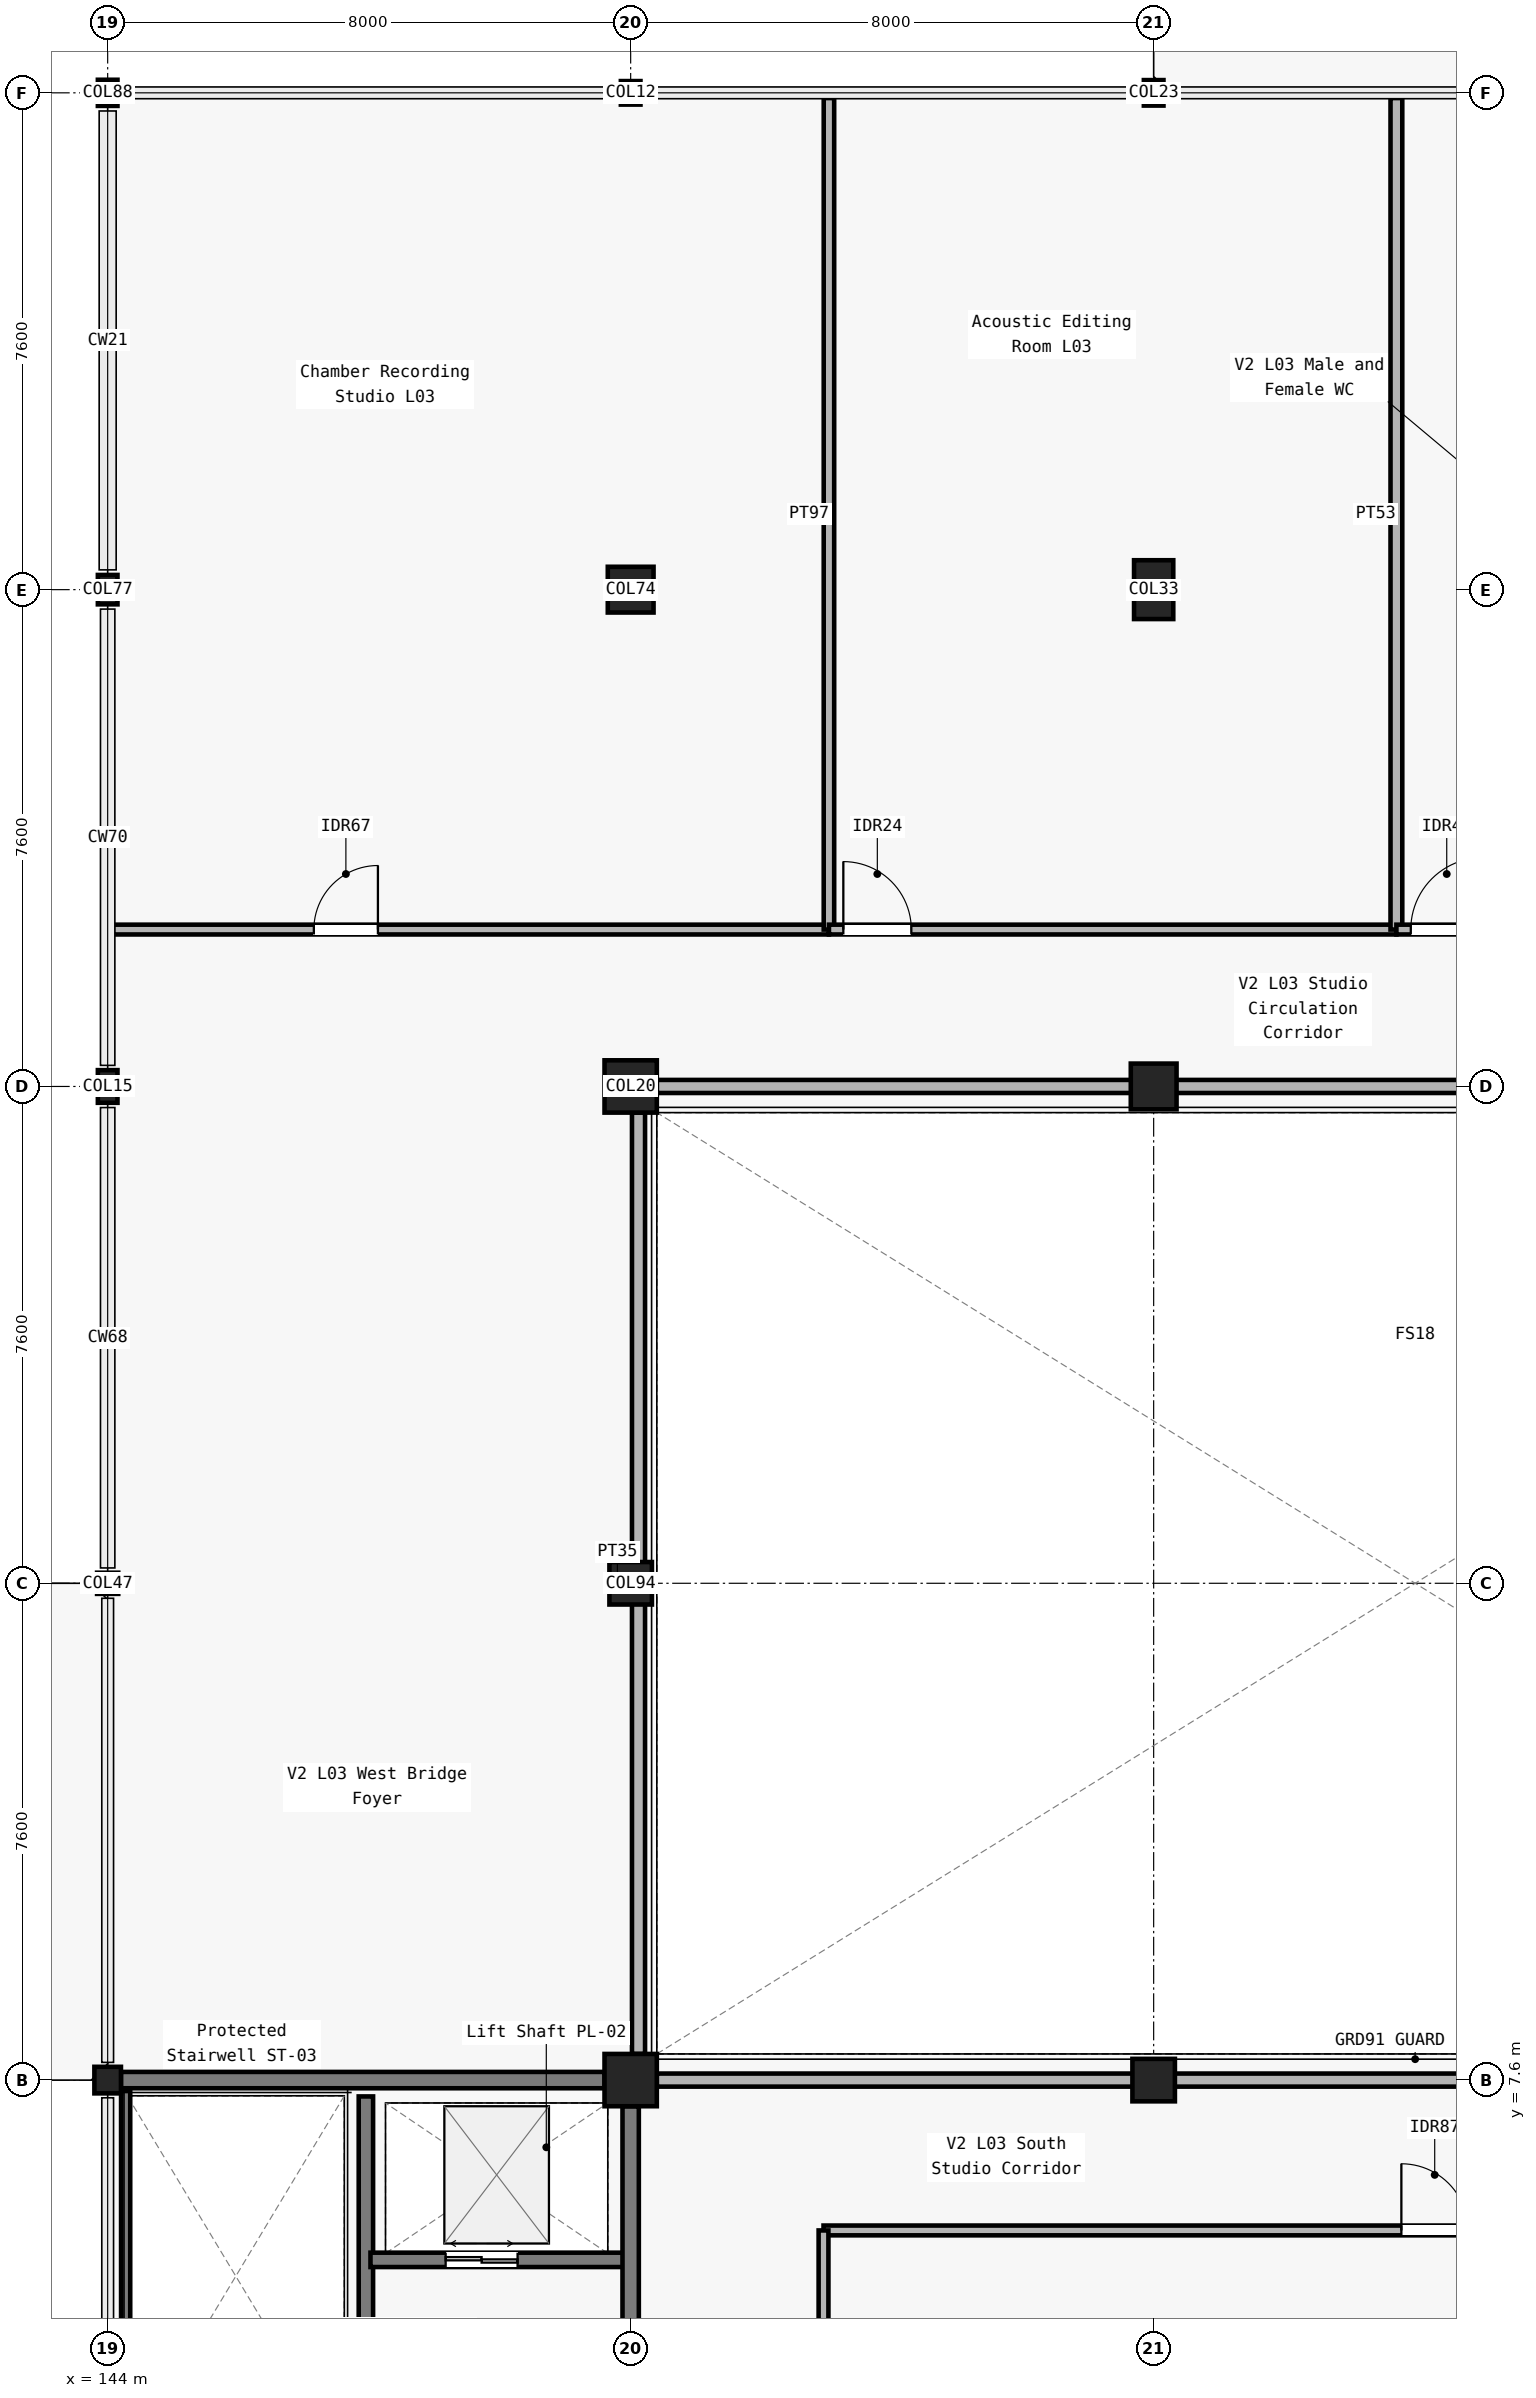
"""IFC4 building model, lengths in metres.
Left out: names, types, materials, properties, quantities, classifications, styles, units other than length and angle.
Written with IfcOpenShell. Run it as: python <this file> out.ifc"""

import sys

from ifc_helpers import new_model, si_unit, direction, frame, frame_2d, origin, origin_2d, place, context, subcontext, project, spatial, rectangle, circle, hollow_circle, i_section, extrude, element, fill, save


model = new_model("IFC4")
c1 = context("Model", 3, precision=1e-05, world=origin(), true_north=direction((0.0, 1.0)))
c2 = subcontext(c1, "Body", "Model", "MODEL_VIEW")
j1 = project(units=[si_unit("LENGTHUNIT", "METRE"), si_unit("PLANEANGLEUNIT", "RADIAN")], contexts=[c1])
p1 = place(None, origin())
s1 = spatial("IfcSite", under=j1, at=p1, CompositionType="ELEMENT")
p2 = place(p1, origin())
s2 = spatial("IfcBuilding", under=s1, at=p2, CompositionType="ELEMENT")
p3 = place(p2, frame((0.0, 0.0, 15.0)))
s3 = spatial("IfcBuildingStorey", under=s2, at=p3, CompositionType="ELEMENT", Elevation=15.0)
p4 = place(p3, frame((144.0, 7.6, 0.0), z_axis=(0.0, 0.0, 1.0), x_axis=(1.0, 0.0, 0.0)))
e1 = element("IfcColumn", 1, at=p4, inside=s3, PredefinedType="COLUMN", context=c2, shape_type="SweptSolid", body=[
    extrude(hollow_circle(Radius=0.203, WallThickness=0.02, at=origin_2d()), origin(), (0.0, 0.0, 1.0), 4.53),
])
p5 = place(p3, frame((144.0, 15.2, 0.0), z_axis=(0.0, 0.0, 1.0), x_axis=(1.0, 0.0, 0.0)))
e2 = element("IfcColumn", 2, at=p5, inside=s3, PredefinedType="COLUMN", context=c2, shape_type="SweptSolid", body=[
    extrude(hollow_circle(Radius=0.162, WallThickness=0.016, at=origin_2d()), origin(), (0.0, 0.0, 1.0), 4.53),
])
p6 = place(p3, frame((144.0, 22.8, 0.0), z_axis=(0.0, 0.0, 1.0), x_axis=(1.0, 0.0, 0.0)))
e3 = element("IfcColumn", 3, at=p6, inside=s3, PredefinedType="COLUMN", context=c2, shape_type="SweptSolid", body=[
    extrude(i_section(OverallWidth=0.3, OverallDepth=0.5, WebThickness=0.014, FlangeThickness=0.028, FilletRadius=0.027, at=origin_2d()), origin(), (0.0, 0.0, 1.0), 4.53),
])
p7 = place(p3, frame((144.0, 30.4, 0.0), z_axis=(0.0, 0.0, 1.0), x_axis=(1.0, 0.0, 0.0)))
e4 = element("IfcColumn", 4, at=p7, inside=s3, PredefinedType="COLUMN", context=c2, shape_type="SweptSolid", body=[
    extrude(i_section(OverallWidth=0.3, OverallDepth=0.45, WebThickness=0.014, FlangeThickness=0.026, FilletRadius=0.027, at=origin_2d()), origin(), (0.0, 0.0, 1.0), 4.53),
])
p8 = place(p3, frame((144.0, 38.0, 0.0), z_axis=(0.0, 0.0, 1.0), x_axis=(1.0, 0.0, 0.0)))
e5 = element("IfcColumn", 5, at=p8, inside=s3, PredefinedType="COLUMN", context=c2, shape_type="SweptSolid", body=[
    extrude(i_section(OverallWidth=0.3, OverallDepth=0.4, WebThickness=0.013, FlangeThickness=0.024, FilletRadius=0.027, at=origin_2d()), origin(), (0.0, 0.0, 1.0), 4.53),
])
p9 = place(p3, frame((152.0, 7.6, 0.0), z_axis=(0.0, 0.0, 1.0), x_axis=(1.0, 0.0, 0.0)))
e6 = element("IfcColumn", 6, at=p9, inside=s3, PredefinedType="COLUMN", context=c2, shape_type="SweptSolid", body=[
    extrude(circle(Radius=0.4, at=origin_2d()), origin(), (0.0, 0.0, 1.0), 4.53),
])
p10 = place(p3, frame((152.0, 15.2, 0.0), z_axis=(0.0, 0.0, 1.0), x_axis=(1.0, 0.0, 0.0)))
e7 = element("IfcColumn", 7, at=p10, inside=s3, PredefinedType="COLUMN", context=c2, shape_type="SweptSolid", body=[
    extrude(circle(Radius=0.325, at=origin_2d()), origin(), (0.0, 0.0, 1.0), 4.53),
])
p11 = place(p3, frame((152.0, 22.8, 0.0), z_axis=(0.0, 0.0, 1.0), x_axis=(1.0, 0.0, 0.0)))
e8 = element("IfcColumn", 8, at=p11, inside=s3, PredefinedType="COLUMN", context=c2, shape_type="SweptSolid", body=[
    extrude(rectangle(XDim=0.8, YDim=0.8, at=origin_2d()), origin(), (0.0, 0.0, 1.0), 4.53),
])
p12 = place(p3, frame((152.0, 30.4, 0.0), z_axis=(0.0, 0.0, 1.0), x_axis=(1.0, 0.0, 0.0)))
e9 = element("IfcColumn", 9, at=p12, inside=s3, PredefinedType="COLUMN", context=c2, shape_type="SweptSolid", body=[
    extrude(rectangle(XDim=0.7, YDim=0.7, at=origin_2d()), origin(), (0.0, 0.0, 1.0), 4.53),
])
p13 = place(p3, frame((152.0, 38.0, 0.0), z_axis=(0.0, 0.0, 1.0), x_axis=(1.0, 0.0, 0.0)))
e10 = element("IfcColumn", 10, at=p13, inside=s3, PredefinedType="COLUMN", context=c2, shape_type="SweptSolid", body=[
    extrude(i_section(OverallWidth=0.3, OverallDepth=0.36, WebThickness=0.012, FlangeThickness=0.022, FilletRadius=0.027, at=origin_2d()), origin(), (0.0, 0.0, 1.0), 4.53),
])
p14 = place(p3, frame((160.0, 7.6, 0.0), z_axis=(0.0, 0.0, 1.0), x_axis=(1.0, 0.0, 0.0)))
e11 = element("IfcColumn", 11, at=p14, inside=s3, PredefinedType="COLUMN", context=c2, shape_type="SweptSolid", body=[
    extrude(circle(Radius=0.325, at=origin_2d()), origin(), (0.0, 0.0, 1.0), 4.53),
])
p15 = place(p3, frame((160.0, 22.8, 0.0), z_axis=(0.0, 0.0, 1.0), x_axis=(1.0, 0.0, 0.0)))
e12 = element("IfcColumn", 12, at=p15, inside=s3, PredefinedType="COLUMN", context=c2, shape_type="SweptSolid", body=[
    extrude(rectangle(XDim=0.7, YDim=0.7, at=origin_2d()), origin(), (0.0, 0.0, 1.0), 4.53),
])
p16 = place(p3, frame((160.0, 30.4, 0.0), z_axis=(0.0, 0.0, 1.0), x_axis=(1.0, 0.0, 0.0)))
e13 = element("IfcColumn", 13, at=p16, inside=s3, PredefinedType="COLUMN", context=c2, shape_type="SweptSolid", body=[
    extrude(rectangle(XDim=0.6, YDim=0.9, at=origin_2d()), origin(), (0.0, 0.0, 1.0), 4.53),
])
p17 = place(p3, frame((160.0, 38.0, 0.0), z_axis=(0.0, 0.0, 1.0), x_axis=(1.0, 0.0, 0.0)))
e14 = element("IfcColumn", 14, at=p17, inside=s3, PredefinedType="COLUMN", context=c2, shape_type="SweptSolid", body=[
    extrude(i_section(OverallWidth=0.3, OverallDepth=0.39, WebThickness=0.011, FlangeThickness=0.019, FilletRadius=0.027, at=origin_2d()), origin(), (0.0, 0.0, 1.0), 4.53),
])
p18 = place(p3, frame((144.203, 7.6, 0.0), z_axis=(0.0, 0.0, 1.0), x_axis=(1.0, 0.0, 0.0)))
e15 = element("IfcWall", 15, at=p18, inside=s3, PredefinedType="SOLIDWALL", context=c2, shape_type="SweptSolid", body=[
    extrude(rectangle(XDim=7.397, YDim=0.25, at=frame_2d((3.698, 0.0))), origin(), (0.0, 0.0, 1.0), 3.88),
])
p19 = place(p3, frame((147.95, 0.25, 0.0), z_axis=(0.0, 0.0, 1.0), x_axis=(0.0, 1.0, 0.0)))
e16 = element("IfcWall", 16, at=p19, inside=s3, PredefinedType="SOLIDWALL", context=c2, shape_type="SweptSolid", body=[
    extrude(rectangle(XDim=7.1, YDim=0.22, at=frame_2d((3.55, 0.0))), origin(), (0.0, 0.0, 1.0), 4.53),
])
p20 = place(p19, frame((0.35, 0.0, 0.0)))
e17 = element("IfcOpeningElement", 17, at=p20, cuts=e16, PredefinedType="OPENING", context=c2, shape_type="SweptSolid", body=[
    extrude(rectangle(XDim=1.2, YDim=2.15, at=frame_2d((0.6, 1.075))), frame((0.0, 0.12, 0.0), z_axis=(0.0, -1.0, 0.0), x_axis=(1.0, 0.0, 0.0)), (0.0, 0.0, 1.0), 0.24),
])
p21 = place(p3, frame((148.02, 4.85, 0.0), z_axis=(0.0, 0.0, 1.0), x_axis=(1.0, 0.0, 0.0)))
e18 = element("IfcWall", 18, at=p21, inside=s3, PredefinedType="SOLIDWALL", context=c2, shape_type="SweptSolid", body=[
    extrude(rectangle(XDim=3.93, YDim=0.22, at=frame_2d((1.965, 0.0))), origin(), (0.0, 0.0, 1.0), 3.88),
])
p22 = place(p21, frame((1.15, 0.0, 0.0)))
e19 = element("IfcOpeningElement", 19, at=p22, cuts=e18, PredefinedType="OPENING", context=c2, shape_type="SweptSolid", body=[
    extrude(rectangle(XDim=1.1, YDim=2.2, at=frame_2d((0.55, 1.1))), frame((0.0, 0.12, 0.0), z_axis=(0.0, -1.0, 0.0), x_axis=(1.0, 0.0, 0.0)), (0.0, 0.0, 1.0), 0.24),
])
p23 = place(p3, frame((152.0, 0.203, 0.0), z_axis=(0.0, 0.0, 1.0), x_axis=(0.0, 1.0, 0.0)))
e20 = element("IfcWall", 20, at=p23, inside=s3, PredefinedType="SOLIDWALL", context=c2, shape_type="SweptSolid", body=[
    extrude(rectangle(XDim=6.997, YDim=0.25, at=frame_2d((3.499, 0.0))), origin(), (0.0, 0.0, 1.0), 3.88),
])
p24 = place(p23, frame((2.147, 0.0, 0.0)))
e21 = element("IfcOpeningElement", 21, at=p24, cuts=e20, PredefinedType="OPENING", context=c2, shape_type="SweptSolid", body=[
    extrude(rectangle(XDim=1.35, YDim=2.2, at=frame_2d((0.675, 1.1))), frame((0.0, 0.135, 0.0), z_axis=(0.0, -1.0, 0.0), x_axis=(1.0, 0.0, 0.0)), (0.0, 0.0, 1.0), 0.27),
])
p25 = place(p3, frame((152.12, 8.0, 0.0), z_axis=(0.0, 0.0, 1.0), x_axis=(0.0, 1.0, 0.0)))
e22 = element("IfcWall", 22, at=p25, inside=s3, PredefinedType="PARTITIONING", context=c2, shape_type="SweptSolid", body=[
    extrude(rectangle(XDim=14.4, YDim=0.2, at=frame_2d((7.2, 0.0))), origin(), (0.0, 0.0, 1.0), 3.88),
])
p26 = place(p3, frame((152.4, 22.8, 0.0), z_axis=(0.0, 0.0, 1.0), x_axis=(1.0, 0.0, 0.0)))
e23 = element("IfcWall", 23, at=p26, inside=s3, PredefinedType="PARTITIONING", context=c2, shape_type="SweptSolid", body=[
    extrude(rectangle(XDim=23.35, YDim=0.2, at=frame_2d((11.675, 0.0))), origin(), (0.0, 0.0, 1.0), 3.73),
])
p27 = place(p3, frame((152.4, 7.6, 0.0), z_axis=(0.0, 0.0, 1.0), x_axis=(1.0, 0.0, 0.0)))
e24 = element("IfcWall", 24, at=p27, inside=s3, PredefinedType="PARTITIONING", context=c2, shape_type="SweptSolid", body=[
    extrude(rectangle(XDim=23.25, YDim=0.2, at=frame_2d((11.625, 0.0))), origin(), (0.0, 0.0, 1.0), 3.73),
])
p28 = place(p3, frame((154.95, 5.3, 0.0), z_axis=(0.0, 0.0, 1.0), x_axis=(1.0, 0.0, 0.0)))
e25 = element("IfcWall", 25, at=p28, inside=s3, PredefinedType="PARTITIONING", context=c2, shape_type="SweptSolid", body=[
    extrude(rectangle(XDim=10.059, YDim=0.15, at=frame_2d((5.03, 0.0))), origin(), (0.0, 0.0, 1.0), 3.88),
])
p29 = place(p28, frame((8.839, 0.0, 0.0)))
e26 = element("IfcOpeningElement", 26, at=p29, cuts=e25, PredefinedType="OPENING", context=c2, shape_type="SweptSolid", body=[
    extrude(rectangle(XDim=1.02, YDim=2.1, at=frame_2d((0.51, 1.05))), frame((0.0, 0.085, 0.0), z_axis=(0.0, -1.0, 0.0), x_axis=(1.0, 0.0, 0.0)), (0.0, 0.0, 1.0), 0.17),
])
p30 = place(p3, frame((154.95, 0.08, 0.0), z_axis=(0.0, 0.0, 1.0), x_axis=(0.0, 1.0, 0.0)))
e27 = element("IfcWall", 27, at=p30, inside=s3, PredefinedType="PARTITIONING", context=c2, shape_type="SweptSolid", body=[
    extrude(rectangle(XDim=5.22, YDim=0.15, at=frame_2d((2.61, 0.0))), origin(), (0.0, 0.0, 1.0), 3.88),
])
p31 = place(p3, frame((144.08, 25.2, 0.0), z_axis=(0.0, 0.0, 1.0), x_axis=(1.0, 0.0, 0.0)))
e28 = element("IfcWall", 28, at=p31, inside=s3, PredefinedType="PARTITIONING", context=c2, shape_type="SweptSolid", body=[
    extrude(rectangle(XDim=10.953, YDim=0.15, at=frame_2d((5.477, 0.0))), origin(), (0.0, 0.0, 1.0), 3.88),
])
p32 = place(p31, frame((3.074, 0.0, 0.0)))
e29 = element("IfcOpeningElement", 29, at=p32, cuts=e28, PredefinedType="OPENING", context=c2, shape_type="SweptSolid", body=[
    extrude(rectangle(XDim=0.98, YDim=2.15, at=frame_2d((0.49, 1.075))), frame((0.0, 0.085, 0.0), z_axis=(0.0, -1.0, 0.0), x_axis=(1.0, 0.0, 0.0)), (0.0, 0.0, 1.0), 0.17),
])
p33 = place(p3, frame((155.033, 25.2, 0.0), z_axis=(0.0, 0.0, 1.0), x_axis=(0.0, 1.0, 0.0)))
e30 = element("IfcWall", 30, at=p33, inside=s3, PredefinedType="PARTITIONING", context=c2, shape_type="SweptSolid", body=[
    extrude(rectangle(XDim=12.72, YDim=0.16, at=frame_2d((6.36, 0.0))), origin(), (0.0, 0.0, 1.0), 3.88),
])
p34 = place(p3, frame((155.033, 25.2, 0.0), z_axis=(0.0, 0.0, 1.0), x_axis=(1.0, 0.0, 0.0)))
e31 = element("IfcWall", 31, at=p34, inside=s3, PredefinedType="PARTITIONING", context=c2, shape_type="SweptSolid", body=[
    extrude(rectangle(XDim=8.68, YDim=0.15, at=frame_2d((4.34, 0.0))), origin(), (0.0, 0.0, 1.0), 3.88),
])
p35 = place(p34, frame((0.22, 0.0, 0.0)))
e32 = element("IfcOpeningElement", 32, at=p35, cuts=e31, PredefinedType="OPENING", context=c2, shape_type="SweptSolid", body=[
    extrude(rectangle(XDim=1.04, YDim=2.15, at=frame_2d((0.52, 1.075))), frame((0.0, 0.085, 0.0), z_axis=(0.0, -1.0, 0.0), x_axis=(1.0, 0.0, 0.0)), (0.0, 0.0, 1.0), 0.17),
])
p36 = place(p3, frame((163.713, 25.2, 0.0), z_axis=(0.0, 0.0, 1.0), x_axis=(0.0, 1.0, 0.0)))
e33 = element("IfcWall", 33, at=p36, inside=s3, PredefinedType="PARTITIONING", context=c2, shape_type="SweptSolid", body=[
    extrude(rectangle(XDim=12.72, YDim=0.18, at=frame_2d((6.36, 0.0))), origin(), (0.0, 0.0, 1.0), 3.88),
])
p37 = place(p3, frame((163.713, 25.2, 0.0), z_axis=(0.0, 0.0, 1.0), x_axis=(1.0, 0.0, 0.0)))
e34 = element("IfcWall", 34, at=p37, inside=s3, PredefinedType="PARTITIONING", context=c2, shape_type="SweptSolid", body=[
    extrude(rectangle(XDim=2.273, YDim=0.15, at=frame_2d((1.137, 0.0))), origin(), (0.0, 0.0, 1.0), 4.53),
])
p38 = place(p37, frame((0.22, 0.0, 0.0)))
e35 = element("IfcOpeningElement", 35, at=p38, cuts=e34, PredefinedType="OPENING", context=c2, shape_type="SweptSolid", body=[
    extrude(rectangle(XDim=1.1, YDim=2.15, at=frame_2d((0.55, 1.075))), frame((0.0, 0.085, 0.0), z_axis=(0.0, -1.0, 0.0), x_axis=(1.0, 0.0, 0.0)), (0.0, 0.0, 1.0), 0.17),
])
p39 = place(p3, frame((144.275, 0.15, 0.0), z_axis=(0.0, 0.0, 1.0), x_axis=(0.0, 1.0, 0.0)))
e36 = element("IfcWall", 36, at=p39, inside=s3, PredefinedType="SOLIDWALL", context=c2, shape_type="SweptSolid", body=[
    extrude(rectangle(XDim=7.3, YDim=0.14, at=frame_2d((3.65, 0.0))), origin(), (0.0, 0.0, 1.0), 4.53),
])
p40 = place(p22, origin())
e37 = element("IfcDoor", 37, at=p40, inside=s3, OperationType="DOUBLE_DOOR_SLIDING", PredefinedType="DOOR", context=c2, shape_type="SweptSolid", body=[
    extrude(rectangle(XDim=1.1, YDim=2.2, at=frame_2d((0.55, 1.1))), frame((0.0, 0.025, 0.0), z_axis=(0.0, -1.0, 0.0), x_axis=(1.0, 0.0, 0.0)), (0.0, 0.0, 1.0), 0.05),
])
fill(e19, e37)
p41 = place(p29, origin())
e38 = element("IfcDoor", 38, at=p41, inside=s3, OperationType="SINGLE_SWING_LEFT", PredefinedType="DOOR", context=c2, shape_type="SweptSolid", body=[
    extrude(rectangle(XDim=1.02, YDim=2.1, at=frame_2d((0.51, 1.05))), frame((0.0, 0.025, 0.0), z_axis=(0.0, -1.0, 0.0), x_axis=(1.0, 0.0, 0.0)), (0.0, 0.0, 1.0), 0.05),
])
fill(e26, e38)
p42 = place(p32, origin())
e39 = element("IfcDoor", 39, at=p42, inside=s3, OperationType="SINGLE_SWING_RIGHT", PredefinedType="DOOR", context=c2, shape_type="SweptSolid", body=[
    extrude(rectangle(XDim=0.98, YDim=2.15, at=frame_2d((0.49, 1.075))), frame((0.0, 0.025, 0.0), z_axis=(0.0, -1.0, 0.0), x_axis=(1.0, 0.0, 0.0)), (0.0, 0.0, 1.0), 0.05),
])
fill(e29, e39)
p43 = place(p35, origin())
e40 = element("IfcDoor", 40, at=p43, inside=s3, OperationType="SINGLE_SWING_LEFT", PredefinedType="DOOR", context=c2, shape_type="SweptSolid", body=[
    extrude(rectangle(XDim=1.04, YDim=2.15, at=frame_2d((0.52, 1.075))), frame((0.0, 0.025, 0.0), z_axis=(0.0, -1.0, 0.0), x_axis=(1.0, 0.0, 0.0)), (0.0, 0.0, 1.0), 0.05),
])
fill(e32, e40)
p44 = place(p38, origin())
e41 = element("IfcDoor", 41, at=p44, inside=s3, OperationType="SINGLE_SWING_RIGHT", PredefinedType="DOOR", context=c2, shape_type="SweptSolid", body=[
    extrude(rectangle(XDim=1.1, YDim=2.15, at=frame_2d((0.55, 1.075))), frame((0.0, 0.025, 0.0), z_axis=(0.0, -1.0, 0.0), x_axis=(1.0, 0.0, 0.0)), (0.0, 0.0, 1.0), 0.05),
])
fill(e35, e41)
save(model, sys.argv[1])
